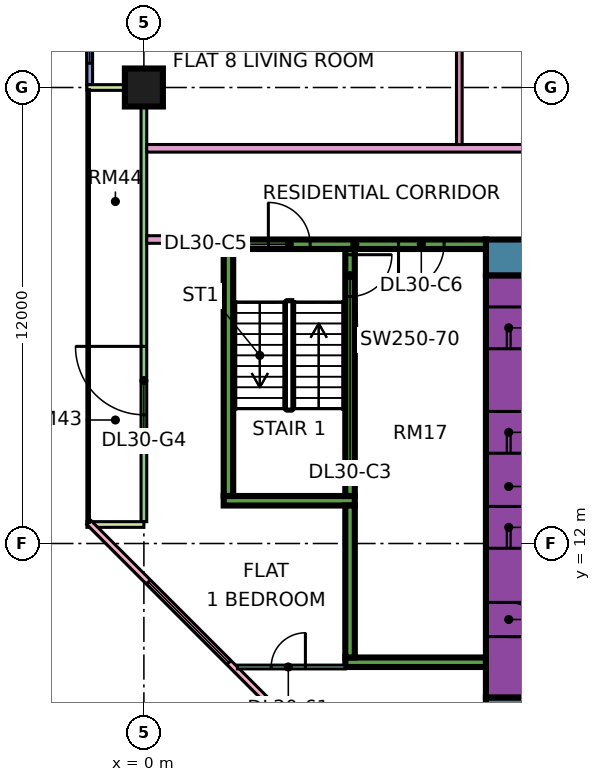
"""IFC4 building model, lengths in metres.
Left out: names, types, materials, properties, quantities, classifications, styles, units other than length and angle.
Written with IfcOpenShell. Run it as: python <this file> out.ifc"""

import sys

from ifc_helpers import new_model, si_unit, direction, frame, frame_2d, origin, origin_2d, place, context, subcontext, project, spatial, rectangle, extrude, element, fill, save


model = new_model("IFC4")
c1 = context("Model", 3, precision=1e-05, world=origin(), true_north=direction((0.0, 1.0)))
c2 = subcontext(c1, "Body", "Model", "MODEL_VIEW")
j1 = project(units=[si_unit("LENGTHUNIT", "METRE"), si_unit("PLANEANGLEUNIT", "RADIAN")], contexts=[c1])
p1 = place(None, origin())
s1 = spatial("IfcSite", under=j1, at=p1, CompositionType="ELEMENT")
p2 = place(p1, origin())
s2 = spatial("IfcBuilding", under=s1, at=p2, CompositionType="ELEMENT")
p3 = place(p2, frame((0.0, 0.0, 129.4)))
s3 = spatial("IfcBuildingStorey", under=s2, at=p3, CompositionType="ELEMENT", Elevation=129.4)
p4 = place(p3, frame((0.0, 24.0, 0.0), z_axis=(0.0, 0.0, 1.0), x_axis=(1.0, 0.0, 0.0)))
e1 = element("IfcColumn", 1, at=p4, inside=s3, PredefinedType="COLUMN", context=c2, shape_type="SweptSolid", body=[
    extrude(rectangle(XDim=1.0, YDim=1.0, at=origin_2d()), origin(), (0.0, 0.0, 1.0), 3.75),
])
p5 = place(p3, frame((9.0, 7.475, 0.0), z_axis=(0.0, 0.0, 1.0), x_axis=(1.0, 0.0, 0.0)))
e2 = element("IfcWall", 2, at=p5, inside=s3, PredefinedType="SHEAR", context=c2, shape_type="SweptSolid", body=[
    extrude(rectangle(XDim=25.0, YDim=0.95, at=frame_2d((12.5, 0.0))), origin(), (0.0, 0.0, 1.0), 3.75),
])
p6 = place(p3, frame((9.0, 19.525, 0.0), z_axis=(0.0, 0.0, 1.0), x_axis=(1.0, 0.0, 0.0)))
e3 = element("IfcWall", 3, at=p6, inside=s3, PredefinedType="SHEAR", context=c2, shape_type="SweptSolid", body=[
    extrude(rectangle(XDim=25.0, YDim=0.95, at=frame_2d((12.5, 0.0))), origin(), (0.0, 0.0, 1.0), 3.75),
])
p7 = place(p6, frame((19.1, 0.0, 0.0)))
e4 = element("IfcOpeningElement", 4, at=p7, cuts=e3, PredefinedType="OPENING", context=c2, shape_type="SweptSolid", body=[
    extrude(rectangle(XDim=1.8, YDim=2.4, at=frame_2d((0.9, 1.2))), frame((0.0, 0.485, 0.0), z_axis=(0.0, -1.0, 0.0), x_axis=(1.0, 0.0, 0.0)), (0.0, 0.0, 1.0), 0.97),
])
p8 = place(p3, frame((9.6, 7.95, 0.0), z_axis=(0.0, 0.0, 1.0), x_axis=(0.0, 1.0, 0.0)))
e5 = element("IfcWall", 5, at=p8, inside=s3, PredefinedType="SHEAR", context=c2, shape_type="SweptSolid", body=[
    extrude(rectangle(XDim=11.1, YDim=1.2, at=frame_2d((5.55, 0.0))), origin(), (0.0, 0.0, 1.0), 3.75),
])
p9 = place(p8, frame((3.925, 0.0, 0.0)))
e6 = element("IfcOpeningElement", 6, at=p9, cuts=e5, PredefinedType="OPENING", context=c2, shape_type="SweptSolid", body=[
    extrude(rectangle(XDim=1.1, YDim=2.2, at=frame_2d((0.55, 1.1))), frame((0.0, 0.61, 0.0), z_axis=(0.0, -1.0, 0.0), x_axis=(1.0, 0.0, 0.0)), (0.0, 0.0, 1.0), 1.22),
])
p10 = place(p8, frame((6.425, 0.0, 0.0)))
e7 = element("IfcOpeningElement", 7, at=p10, cuts=e5, PredefinedType="OPENING", context=c2, shape_type="SweptSolid", body=[
    extrude(rectangle(XDim=1.1, YDim=2.2, at=frame_2d((0.55, 1.1))), frame((0.0, 0.61, 0.0), z_axis=(0.0, -1.0, 0.0), x_axis=(1.0, 0.0, 0.0)), (0.0, 0.0, 1.0), 1.22),
])
p11 = place(p8, frame((9.175, 0.0, 0.0)))
e8 = element("IfcOpeningElement", 8, at=p11, cuts=e5, PredefinedType="OPENING", context=c2, shape_type="SweptSolid", body=[
    extrude(rectangle(XDim=1.1, YDim=2.2, at=frame_2d((0.55, 1.1))), frame((0.0, 0.61, 0.0), z_axis=(0.0, -1.0, 0.0), x_axis=(1.0, 0.0, 0.0)), (0.0, 0.0, 1.0), 1.22),
])
p12 = place(p8, frame((1.6, 0.0, 0.0)))
e9 = element("IfcOpeningElement", 9, at=p12, cuts=e5, PredefinedType="OPENING", context=c2, shape_type="SweptSolid", body=[
    extrude(rectangle(XDim=0.9, YDim=2.1, at=frame_2d((0.45, 1.05))), frame((0.0, 0.61, 0.0), z_axis=(0.0, -1.0, 0.0), x_axis=(1.0, 0.0, 0.0)), (0.0, 0.0, 1.0), 1.22),
])
p13 = place(p3, frame((2.1, 19.875, 0.0), z_axis=(0.0, 0.0, 1.0), x_axis=(1.0, 0.0, 0.0)))
e10 = element("IfcWall", 10, at=p13, inside=s3, PredefinedType="SHEAR", context=c2, shape_type="SweptSolid", body=[
    extrude(rectangle(XDim=6.9, YDim=0.25, at=frame_2d((3.45, 0.0))), origin(), (0.0, 0.0, 1.0), 3.75),
])
p14 = place(p13, frame((1.175, 0.0, 0.0)))
e11 = element("IfcOpeningElement", 11, at=p14, cuts=e10, PredefinedType="OPENING", context=c2, shape_type="SweptSolid", body=[
    extrude(rectangle(XDim=1.1, YDim=2.2, at=frame_2d((0.55, 1.1))), frame((0.0, 0.135, 0.0), z_axis=(0.0, -1.0, 0.0), x_axis=(1.0, 0.0, 0.0)), (0.0, 0.0, 1.0), 0.27),
])
p15 = place(p13, frame((4.6, 0.0, 0.0)))
e12 = element("IfcOpeningElement", 12, at=p15, cuts=e10, PredefinedType="OPENING", context=c2, shape_type="SweptSolid", body=[
    extrude(rectangle(XDim=1.2, YDim=2.2, at=frame_2d((0.6, 1.1))), frame((0.0, 0.135, 0.0), z_axis=(0.0, -1.0, 0.0), x_axis=(1.0, 0.0, 0.0)), (0.0, 0.0, 1.0), 0.27),
])
p16 = place(p3, frame((2.1, 13.125, 0.0), z_axis=(0.0, 0.0, 1.0), x_axis=(1.0, 0.0, 0.0)))
e13 = element("IfcWall", 13, at=p16, inside=s3, PredefinedType="SHEAR", context=c2, shape_type="SweptSolid", body=[
    extrude(rectangle(XDim=3.45, YDim=0.25, at=frame_2d((1.725, 0.0))), origin(), (0.0, 0.0, 1.0), 3.75),
])
p17 = place(p3, frame((2.225, 13.25, 0.0), z_axis=(0.0, 0.0, 1.0), x_axis=(0.0, 1.0, 0.0)))
e14 = element("IfcWall", 14, at=p17, inside=s3, PredefinedType="SHEAR", context=c2, shape_type="SweptSolid", body=[
    extrude(rectangle(XDim=6.5, YDim=0.25, at=frame_2d((3.25, 0.0))), origin(), (0.0, 0.0, 1.0), 3.75),
])
p18 = place(p3, frame((5.425, 13.25, 0.0), z_axis=(0.0, 0.0, 1.0), x_axis=(0.0, 1.0, 0.0)))
e15 = element("IfcWall", 15, at=p18, inside=s3, PredefinedType="SHEAR", context=c2, shape_type="SweptSolid", body=[
    extrude(rectangle(XDim=6.5, YDim=0.25, at=frame_2d((3.25, 0.0))), origin(), (0.0, 0.0, 1.0), 3.75),
])
p19 = place(p18, frame((5.25, 0.0, 0.0)))
e16 = element("IfcOpeningElement", 16, at=p19, cuts=e15, PredefinedType="OPENING", context=c2, shape_type="SweptSolid", body=[
    extrude(rectangle(XDim=1.1, YDim=2.2, at=frame_2d((0.55, 1.1))), frame((0.0, 0.135, 0.0), z_axis=(0.0, -1.0, 0.0), x_axis=(1.0, 0.0, 0.0)), (0.0, 0.0, 1.0), 0.27),
])
p20 = place(p3, frame((5.3, 8.875, 0.0), z_axis=(0.0, 0.0, 1.0), x_axis=(1.0, 0.0, 0.0)))
e17 = element("IfcWall", 17, at=p20, inside=s3, PredefinedType="SHEAR", context=c2, shape_type="SweptSolid", body=[
    extrude(rectangle(XDim=3.7, YDim=0.25, at=frame_2d((1.85, 0.0))), origin(), (0.0, 0.0, 1.0), 3.75),
])
p21 = place(p3, frame((5.425, 9.0, 0.0), z_axis=(0.0, 0.0, 1.0), x_axis=(0.0, 1.0, 0.0)))
e18 = element("IfcWall", 18, at=p21, inside=s3, PredefinedType="SHEAR", context=c2, shape_type="SweptSolid", body=[
    extrude(rectangle(XDim=4.0, YDim=0.25, at=frame_2d((2.0, 0.0))), origin(), (0.0, 0.0, 1.0), 3.75),
])
p22 = place(p3, frame((-1.425, 35.925, 0.0), z_axis=(0.0, 0.0, 1.0), x_axis=(0.0, -1.0, 0.0)))
e19 = element("IfcWall", 19, at=p22, inside=s3, PredefinedType="SOLIDWALL", context=c2, shape_type="SweptSolid", body=[
    extrude(rectangle(XDim=11.85, YDim=0.15, at=frame_2d((5.925, 0.0))), origin(), (0.0, 0.0, 1.0), 3.35),
])
p23 = place(p22, frame((0.562, 0.0, 0.45)))
e20 = element("IfcOpeningElement", 20, at=p23, cuts=e19, PredefinedType="OPENING", context=c2, shape_type="SweptSolid", body=[
    extrude(rectangle(XDim=1.8, YDim=2.4, at=frame_2d((0.9, 1.2))), frame((0.0, 0.085, 0.0), z_axis=(0.0, -1.0, 0.0), x_axis=(1.0, 0.0, 0.0)), (0.0, 0.0, 1.0), 0.17),
])
p24 = place(p22, frame((4.425, 0.0, 0.45)))
e21 = element("IfcOpeningElement", 21, at=p24, cuts=e19, PredefinedType="OPENING", context=c2, shape_type="SweptSolid", body=[
    extrude(rectangle(XDim=3.0, YDim=2.4, at=frame_2d((1.5, 1.2))), frame((0.0, 0.085, 0.0), z_axis=(0.0, -1.0, 0.0), x_axis=(1.0, 0.0, 0.0)), (0.0, 0.0, 1.0), 0.17),
])
p25 = place(p22, frame((9.488, 0.0, 0.45)))
e22 = element("IfcOpeningElement", 22, at=p25, cuts=e19, PredefinedType="OPENING", context=c2, shape_type="SweptSolid", body=[
    extrude(rectangle(XDim=1.8, YDim=2.4, at=frame_2d((0.9, 1.2))), frame((0.0, 0.085, 0.0), z_axis=(0.0, -1.0, 0.0), x_axis=(1.0, 0.0, 0.0)), (0.0, 0.0, 1.0), 0.17),
])
p26 = place(p3, frame((0.0, 23.925, 0.0), z_axis=(0.0, 0.0, 1.0), x_axis=(0.0, -1.0, 0.0)))
e23 = element("IfcWall", 23, at=p26, inside=s3, PredefinedType="SOLIDWALL", context=c2, shape_type="SweptSolid", body=[
    extrude(rectangle(XDim=11.35, YDim=0.15, at=frame_2d((5.675, 0.0))), origin(), (0.0, 0.0, 1.0), 3.35),
])
p27 = place(p26, frame((6.738, 0.0, 0.0)))
e24 = element("IfcOpeningElement", 24, at=p27, cuts=e23, PredefinedType="OPENING", context=c2, shape_type="SweptSolid", body=[
    extrude(rectangle(XDim=1.8, YDim=2.4, at=frame_2d((0.9, 1.2))), frame((0.0, 0.085, 0.0), z_axis=(0.0, -1.0, 0.0), x_axis=(1.0, 0.0, 0.0)), (0.0, 0.0, 1.0), 0.17),
])
for number, where, z_axis, x_axis in (
    (25, (-1.5, 24.0, 0.0), (0.0, 0.0, 1.0), (1.0, 0.0, 0.0)),
    (26, (-1.5, 12.5, 0.0), (0.0, 0.0, 1.0), (1.0, 0.0, 0.0)),
):
    element("IfcWall", number, at=place(p3, frame(where, z_axis=z_axis, x_axis=x_axis)), inside=s3, PredefinedType="SOLIDWALL", context=c2, shape_type="SweptSolid", body=[
        extrude(rectangle(XDim=1.5, YDim=0.15, at=frame_2d((0.75, 0.0))), origin(), (0.0, 0.0, 1.0), 3.35),
    ])
p28 = place(p3, frame((-1.447, 12.553, 0.0), z_axis=(0.0, 0.0, 1.0), x_axis=(0.707106781187, -0.707106781187, 0.0)))
e27 = element("IfcWall", 27, at=p28, inside=s3, PredefinedType="SOLIDWALL", context=c2, shape_type="SweptSolid", body=[
    extrude(rectangle(XDim=19.799, YDim=0.15, at=frame_2d((9.899, 0.0))), origin(), (0.0, 0.0, 1.0), 3.35),
])
p29 = place(p28, frame((2.212, 0.0, 0.45)))
e28 = element("IfcOpeningElement", 28, at=p29, cuts=e27, PredefinedType="OPENING", context=c2, shape_type="SweptSolid", body=[
    extrude(rectangle(XDim=3.0, YDim=2.4, at=frame_2d((1.5, 1.2))), frame((0.0, 0.085, 0.0), z_axis=(0.0, -1.0, 0.0), x_axis=(1.0, 0.0, 0.0)), (0.0, 0.0, 1.0), 0.17),
])
p30 = place(p28, frame((10.216, 0.0, 0.45)))
e29 = element("IfcOpeningElement", 29, at=p30, cuts=e27, PredefinedType="OPENING", context=c2, shape_type="SweptSolid", body=[
    extrude(rectangle(XDim=3.0, YDim=2.4, at=frame_2d((1.5, 1.2))), frame((0.0, 0.085, 0.0), z_axis=(0.0, -1.0, 0.0), x_axis=(1.0, 0.0, 0.0)), (0.0, 0.0, 1.0), 0.17),
])
p31 = place(p3, frame((0.074, 20.0, 0.0), z_axis=(0.0, 0.0, 1.0), x_axis=(1.0, 0.0, 0.0)))
e30 = element("IfcWall", 30, at=p31, inside=s3, PredefinedType="PARTITIONING", context=c2, shape_type="SweptSolid", body=[
    extrude(rectangle(XDim=2.026, YDim=0.2, at=frame_2d((1.013, 0.0))), origin(), (0.0, 0.0, 1.0), 3.35),
])
p32 = place(p3, frame((0.074, 22.4, 0.0), z_axis=(0.0, 0.0, 1.0), x_axis=(1.0, 0.0, 0.0)))
e31 = element("IfcWall", 31, at=p32, inside=s3, PredefinedType="PARTITIONING", context=c2, shape_type="SweptSolid", body=[
    extrude(rectangle(XDim=12.326, YDim=0.2, at=frame_2d((6.163, 0.0))), origin(), (0.0, 0.0, 1.0), 3.35),
])
p33 = place(p3, frame((2.461, 8.75, 0.0), z_axis=(0.0, 0.0, 1.0), x_axis=(1.0, 0.0, 0.0)))
e32 = element("IfcWall", 32, at=p33, inside=s3, PredefinedType="PARTITIONING", context=c2, shape_type="SweptSolid", body=[
    extrude(rectangle(XDim=2.839, YDim=0.1, at=frame_2d((1.419, 0.0))), origin(), (0.0, 0.0, 1.0), 3.35),
])
p34 = place(p33, frame((0.889, 0.0, 0.0)))
e33 = element("IfcOpeningElement", 33, at=p34, cuts=e32, PredefinedType="OPENING", context=c2, shape_type="SweptSolid", body=[
    extrude(rectangle(XDim=0.9, YDim=2.1, at=frame_2d((0.45, 1.05))), frame((0.0, 0.06, 0.0), z_axis=(0.0, -1.0, 0.0), x_axis=(1.0, 0.0, 0.0)), (0.0, 0.0, 1.0), 0.12),
])
p35 = place(p3, frame((8.3, 22.5, 0.0), z_axis=(0.0, 0.0, 1.0), x_axis=(0.0, 1.0, 0.0)))
e34 = element("IfcWall", 34, at=p35, inside=s3, PredefinedType="PARTITIONING", context=c2, shape_type="SweptSolid", body=[
    extrude(rectangle(XDim=9.975, YDim=0.15, at=frame_2d((4.988, 0.0))), origin(), (0.0, 0.0, 1.0), 3.35),
])
p36 = place(p35, frame((8.1, 0.0, 0.0)))
e35 = element("IfcOpeningElement", 35, at=p36, cuts=e34, PredefinedType="OPENING", context=c2, shape_type="SweptSolid", body=[
    extrude(rectangle(XDim=0.8, YDim=2.1, at=frame_2d((0.4, 1.05))), frame((0.0, 0.085, 0.0), z_axis=(0.0, -1.0, 0.0), x_axis=(1.0, 0.0, 0.0)), (0.0, 0.0, 1.0), 0.17),
])
p37 = place(p35, frame((3.05, 0.0, 0.0)))
e36 = element("IfcOpeningElement", 36, at=p37, cuts=e34, PredefinedType="OPENING", context=c2, shape_type="SweptSolid", body=[
    extrude(rectangle(XDim=0.9, YDim=2.1, at=frame_2d((0.45, 1.05))), frame((0.0, 0.085, 0.0), z_axis=(0.0, -1.0, 0.0), x_axis=(1.0, 0.0, 0.0)), (0.0, 0.0, 1.0), 0.17),
])
p38 = place(p25, origin())
e37 = element("IfcWindow", 37, at=p38, inside=s3, PartitioningType="SINGLE_PANEL", PredefinedType="WINDOW", context=c2, shape_type="SweptSolid", body=[
    extrude(rectangle(XDim=1.8, YDim=2.4, at=frame_2d((0.9, 1.2))), frame((0.0, 0.03, 0.0), z_axis=(0.0, -1.0, 0.0), x_axis=(1.0, 0.0, 0.0)), (0.0, 0.0, 1.0), 0.06),
])
fill(e22, e37)
p39 = place(p27, frame((1.8, 0.0, 0.0), z_axis=(0.0, 0.0, 1.0), x_axis=(-1.0, 0.0, 0.0)))
e38 = element("IfcDoor", 38, at=p39, inside=s3, OperationType="DOUBLE_DOOR_SINGLE_SWING", PredefinedType="DOOR", context=c2, shape_type="SweptSolid", body=[
    extrude(rectangle(XDim=1.8, YDim=2.4, at=frame_2d((0.9, 1.2))), frame((0.0, 0.025, 0.0), z_axis=(0.0, -1.0, 0.0), x_axis=(1.0, 0.0, 0.0)), (0.0, 0.0, 1.0), 0.05),
])
fill(e24, e38)
p40 = place(p29, origin())
e39 = element("IfcWindow", 39, at=p40, inside=s3, PartitioningType="SINGLE_PANEL", PredefinedType="WINDOW", context=c2, shape_type="SweptSolid", body=[
    extrude(rectangle(XDim=3.0, YDim=2.4, at=frame_2d((1.5, 1.2))), frame((0.0, 0.03, 0.0), z_axis=(0.0, -1.0, 0.0), x_axis=(1.0, 0.0, 0.0)), (0.0, 0.0, 1.0), 0.06),
])
fill(e28, e39)
p41 = place(p9, origin())
e40 = element("IfcDoor", 40, at=p41, inside=s3, OperationType="DOUBLE_DOOR_SLIDING", PredefinedType="DOOR", context=c2, shape_type="SweptSolid", body=[
    extrude(rectangle(XDim=1.1, YDim=2.2, at=frame_2d((0.55, 1.1))), frame((0.0, 0.025, 0.0), z_axis=(0.0, -1.0, 0.0), x_axis=(1.0, 0.0, 0.0)), (0.0, 0.0, 1.0), 0.05),
])
fill(e6, e40)
p42 = place(p10, origin())
e41 = element("IfcDoor", 41, at=p42, inside=s3, OperationType="DOUBLE_DOOR_SLIDING", PredefinedType="DOOR", context=c2, shape_type="SweptSolid", body=[
    extrude(rectangle(XDim=1.1, YDim=2.2, at=frame_2d((0.55, 1.1))), frame((0.0, 0.025, 0.0), z_axis=(0.0, -1.0, 0.0), x_axis=(1.0, 0.0, 0.0)), (0.0, 0.0, 1.0), 0.05),
])
fill(e7, e41)
p43 = place(p11, origin())
e42 = element("IfcDoor", 42, at=p43, inside=s3, OperationType="DOUBLE_DOOR_SLIDING", PredefinedType="DOOR", context=c2, shape_type="SweptSolid", body=[
    extrude(rectangle(XDim=1.1, YDim=2.2, at=frame_2d((0.55, 1.1))), frame((0.0, 0.025, 0.0), z_axis=(0.0, -1.0, 0.0), x_axis=(1.0, 0.0, 0.0)), (0.0, 0.0, 1.0), 0.05),
])
fill(e8, e42)
p44 = place(p19, origin())
e43 = element("IfcDoor", 43, at=p44, inside=s3, OperationType="SINGLE_SWING_RIGHT", PredefinedType="DOOR", context=c2, shape_type="SweptSolid", body=[
    extrude(rectangle(XDim=1.1, YDim=2.2, at=frame_2d((0.55, 1.1))), frame((0.0, 0.025, 0.0), z_axis=(0.0, -1.0, 0.0), x_axis=(1.0, 0.0, 0.0)), (0.0, 0.0, 1.0), 0.05),
])
fill(e16, e43)
p45 = place(p12, frame((0.9, 0.0, 0.0), z_axis=(0.0, 0.0, 1.0), x_axis=(-1.0, 0.0, 0.0)))
e44 = element("IfcDoor", 44, at=p45, inside=s3, OperationType="SINGLE_SWING_LEFT", PredefinedType="DOOR", context=c2, shape_type="SweptSolid", body=[
    extrude(rectangle(XDim=0.9, YDim=2.1, at=frame_2d((0.45, 1.05))), frame((0.0, 0.025, 0.0), z_axis=(0.0, -1.0, 0.0), x_axis=(1.0, 0.0, 0.0)), (0.0, 0.0, 1.0), 0.05),
])
fill(e9, e44)
p46 = place(p14, origin())
e45 = element("IfcDoor", 45, at=p46, inside=s3, OperationType="SINGLE_SWING_LEFT", PredefinedType="DOOR", context=c2, shape_type="SweptSolid", body=[
    extrude(rectangle(XDim=1.1, YDim=2.2, at=frame_2d((0.55, 1.1))), frame((0.0, 0.025, 0.0), z_axis=(0.0, -1.0, 0.0), x_axis=(1.0, 0.0, 0.0)), (0.0, 0.0, 1.0), 0.05),
])
fill(e11, e45)
p47 = place(p15, frame((1.2, 0.0, 0.0), z_axis=(0.0, 0.0, 1.0), x_axis=(-1.0, 0.0, 0.0)))
e46 = element("IfcDoor", 46, at=p47, inside=s3, OperationType="SINGLE_SWING_LEFT", PredefinedType="DOOR", context=c2, shape_type="SweptSolid", body=[
    extrude(rectangle(XDim=1.2, YDim=2.2, at=frame_2d((0.6, 1.1))), frame((0.0, 0.025, 0.0), z_axis=(0.0, -1.0, 0.0), x_axis=(1.0, 0.0, 0.0)), (0.0, 0.0, 1.0), 0.05),
])
fill(e12, e46)
p48 = place(p34, frame((0.9, 0.0, 0.0), z_axis=(0.0, 0.0, 1.0), x_axis=(-1.0, 0.0, 0.0)))
e47 = element("IfcDoor", 47, at=p48, inside=s3, OperationType="SINGLE_SWING_RIGHT", PredefinedType="DOOR", context=c2, shape_type="SweptSolid", body=[
    extrude(rectangle(XDim=0.9, YDim=2.1, at=frame_2d((0.45, 1.05))), frame((0.0, 0.025, 0.0), z_axis=(0.0, -1.0, 0.0), x_axis=(1.0, 0.0, 0.0)), (0.0, 0.0, 1.0), 0.05),
])
fill(e33, e47)
save(model, sys.argv[1])
